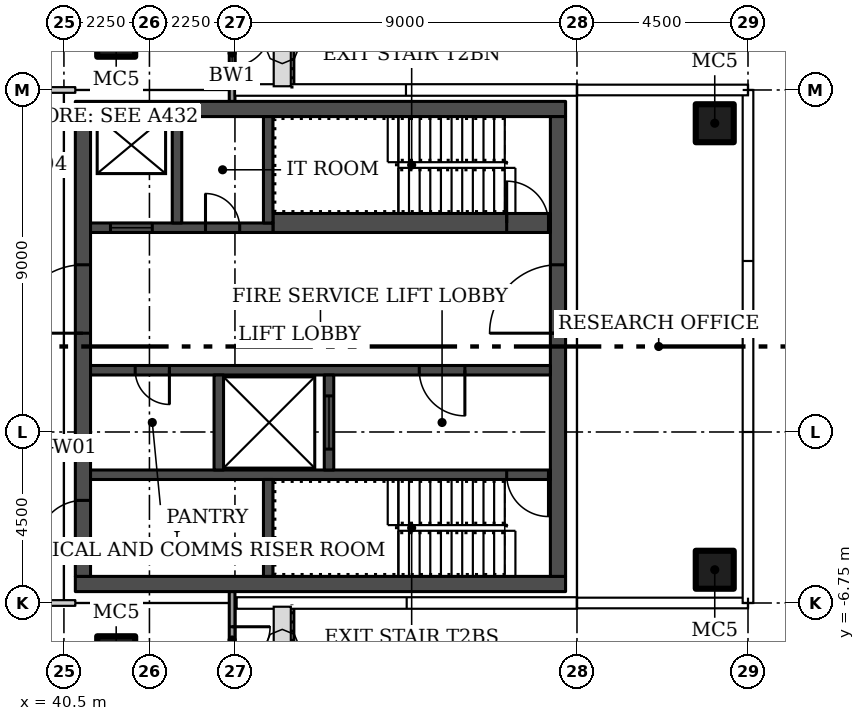
"""IFC4 building model, lengths in metres.
Left out: names, types, materials, properties, quantities, classifications, styles, units other than length and angle.
Written with IfcOpenShell. Run it as: python <this file> out.ifc"""

import sys

from ifc_helpers import new_model, si_unit, direction, frame, frame_2d, origin, origin_2d, place, context, subcontext, project, spatial, rectangle, hollow_rectangle, extrude, element, fill, save


model = new_model("IFC4")
c1 = context("Model", 3, precision=1e-05, world=origin(), true_north=direction((0.0, 1.0)))
c2 = subcontext(c1, "Body", "Model", "MODEL_VIEW")
j1 = project(units=[si_unit("LENGTHUNIT", "METRE"), si_unit("PLANEANGLEUNIT", "RADIAN")], contexts=[c1])
p1 = place(None, origin())
s1 = spatial("IfcSite", under=j1, at=p1, CompositionType="ELEMENT")
p2 = place(p1, origin())
s2 = spatial("IfcBuilding", under=s1, at=p2, CompositionType="ELEMENT")
p3 = place(p2, frame((0.0, 0.0, 182.7)))
s3 = spatial("IfcBuildingStorey", under=s2, at=p3, CompositionType="ELEMENT", Elevation=182.7)
for number, where in (
    (1, (41.875, 8.125, 0.0)),
    (2, (41.875, -8.125, 0.0)),
    (3, (57.625, -5.875, 0.0)),
    (4, (57.625, 5.875, 0.0)),
):
    element("IfcColumn", number, at=place(p3, frame(where)), inside=s3, PredefinedType="COLUMN", context=c2, shape_type="SweptSolid", body=[
        extrude(hollow_rectangle(XDim=1.0, YDim=1.0, WallThickness=0.04, at=origin_2d()), origin(), (0.0, 0.0, 1.0), 3.55),
    ])
p4 = place(p3, frame((26.7, 6.75, 0.0)))
e5 = element("IfcWall", 5, at=p4, inside=s3, PredefinedType="PARTITIONING", context=c2, shape_type="SweptSolid", body=[
    extrude(rectangle(XDim=14.1, YDim=0.15, at=frame_2d((7.05, 0.0))), origin(), (0.0, 0.0, 1.0), 3.55),
])
p5 = place(p4, frame((10.8, 0.0, 0.0)))
e6 = element("IfcOpeningElement", 6, at=p5, cuts=e5, PredefinedType="OPENING", context=c2, shape_type="SweptSolid", body=[
    extrude(rectangle(XDim=1.5, YDim=2.1, at=frame_2d((0.75, 1.05))), frame((0.0, 0.085, 0.0), z_axis=(0.0, -1.0, 0.0), x_axis=(1.0, 0.0, 0.0)), (0.0, 0.0, 1.0), 0.17),
])
p6 = place(p4, frame((6.6, 0.0, 0.0)))
e7 = element("IfcOpeningElement", 7, at=p6, cuts=e5, PredefinedType="OPENING", context=c2, shape_type="SweptSolid", body=[
    extrude(rectangle(XDim=0.9, YDim=2.1, at=frame_2d((0.45, 1.05))), frame((0.0, 0.085, 0.0), z_axis=(0.0, -1.0, 0.0), x_axis=(1.0, 0.0, 0.0)), (0.0, 0.0, 1.0), 0.17),
])
p7 = place(p4, frame((1.8, 0.0, 0.0)))
e8 = element("IfcOpeningElement", 8, at=p7, cuts=e5, PredefinedType="OPENING", context=c2, shape_type="SweptSolid", body=[
    extrude(rectangle(XDim=1.5, YDim=2.1, at=frame_2d((0.75, 1.05))), frame((0.0, 0.085, 0.0), z_axis=(0.0, -1.0, 0.0), x_axis=(1.0, 0.0, 0.0)), (0.0, 0.0, 1.0), 0.17),
])
p8 = place(p3, frame((40.8, -6.75, 0.0), z_axis=(0.0, 0.0, 1.0), x_axis=(-1.0, 0.0, 0.0)))
e9 = element("IfcWall", 9, at=p8, inside=s3, PredefinedType="PARTITIONING", context=c2, shape_type="SweptSolid", body=[
    extrude(rectangle(XDim=14.1, YDim=0.15, at=frame_2d((7.05, 0.0))), origin(), (0.0, 0.0, 1.0), 3.55),
])
p9 = place(p8, frame((6.3, 0.0, 0.0)))
e10 = element("IfcOpeningElement", 10, at=p9, cuts=e9, PredefinedType="OPENING", context=c2, shape_type="SweptSolid", body=[
    extrude(rectangle(XDim=1.5, YDim=2.1, at=frame_2d((0.75, 1.05))), frame((0.0, 0.085, 0.0), z_axis=(0.0, -1.0, 0.0), x_axis=(1.0, 0.0, 0.0)), (0.0, 0.0, 1.0), 0.17),
])
p10 = place(p3, frame((44.925, 9.0, 0.0), z_axis=(0.0, 0.0, 1.0), x_axis=(0.0, -1.0, 0.0)))
e11 = element("IfcWall", 11, at=p10, inside=s3, PredefinedType="SOLIDWALL", context=c2, shape_type="SweptSolid", body=[
    extrude(rectangle(XDim=2.557, YDim=0.15, at=frame_2d((1.278, 0.0))), origin(), (0.0, 0.0, 1.0), 3.45),
])
p11 = place(p10, frame((0.625, 0.0, 0.0)))
e12 = element("IfcOpeningElement", 12, at=p11, cuts=e11, PredefinedType="OPENING", context=c2, shape_type="SweptSolid", body=[
    extrude(rectangle(XDim=1.0, YDim=2.4, at=frame_2d((0.5, 1.2))), frame((0.0, 0.085, 0.0), z_axis=(0.0, -1.0, 0.0), x_axis=(1.0, 0.0, 0.0)), (0.0, 0.0, 1.0), 0.17),
])
p12 = place(p3, frame((44.925, -6.448, 0.0), z_axis=(0.0, 0.0, 1.0), x_axis=(0.0, -1.0, 0.0)))
e13 = element("IfcWall", 13, at=p12, inside=s3, PredefinedType="SOLIDWALL", context=c2, shape_type="SweptSolid", body=[
    extrude(rectangle(XDim=2.552, YDim=0.15, at=frame_2d((1.276, 0.0))), origin(), (0.0, 0.0, 1.0), 3.45),
])
p13 = place(p12, frame((0.927, 0.0, 0.0)))
e14 = element("IfcOpeningElement", 14, at=p13, cuts=e13, PredefinedType="OPENING", context=c2, shape_type="SweptSolid", body=[
    extrude(rectangle(XDim=1.0, YDim=2.4, at=frame_2d((0.5, 1.2))), frame((0.0, 0.085, 0.0), z_axis=(0.0, -1.0, 0.0), x_axis=(1.0, 0.0, 0.0)), (0.0, 0.0, 1.0), 0.17),
])
for number, where, z_axis, x_axis in (
    (15, (53.7, -6.25, 0.0), (0.0, 0.0, 1.0), (-1.0, 0.0, 0.0)),
    (16, (53.7, 6.25, 0.0), (0.0, 0.0, 1.0), (-1.0, 0.0, 0.0)),
):
    element("IfcWall", number, at=place(p3, frame(where, z_axis=z_axis, x_axis=x_axis)), inside=s3, PredefinedType="SHEAR", context=c2, shape_type="SweptSolid", body=[
        extrude(rectangle(XDim=12.9, YDim=0.4, at=frame_2d((6.45, 0.0))), origin(), (0.0, 0.0, 1.0), 3.55),
    ])
p14 = place(p3, frame((53.5, -6.05, 0.0), z_axis=(0.0, 0.0, 1.0), x_axis=(0.0, 1.0, 0.0)))
e17 = element("IfcWall", 17, at=p14, inside=s3, PredefinedType="SHEAR", context=c2, shape_type="SweptSolid", body=[
    extrude(rectangle(XDim=12.1, YDim=0.4, at=frame_2d((6.05, 0.0))), origin(), (0.0, 0.0, 1.0), 3.55),
])
p15 = place(p14, frame((6.4, 0.0, 0.0)))
e18 = element("IfcOpeningElement", 18, at=p15, cuts=e17, PredefinedType="OPENING", context=c2, shape_type="SweptSolid", body=[
    extrude(rectangle(XDim=1.8, YDim=2.4, at=frame_2d((0.9, 1.2))), frame((0.0, 0.21, 0.0), z_axis=(0.0, -1.0, 0.0), x_axis=(1.0, 0.0, 0.0)), (0.0, 0.0, 1.0), 0.42),
])
p16 = place(p3, frame((41.0, -6.05, 0.0), z_axis=(0.0, 0.0, 1.0), x_axis=(0.0, 1.0, 0.0)))
e19 = element("IfcWall", 19, at=p16, inside=s3, PredefinedType="SHEAR", context=c2, shape_type="SweptSolid", body=[
    extrude(rectangle(XDim=12.1, YDim=0.4, at=frame_2d((6.05, 0.0))), origin(), (0.0, 0.0, 1.0), 3.55),
])
p17 = place(p16, frame((0.8, 0.0, 0.0)))
e20 = element("IfcOpeningElement", 20, at=p17, cuts=e19, PredefinedType="OPENING", context=c2, shape_type="SweptSolid", body=[
    extrude(rectangle(XDim=1.2, YDim=2.1, at=frame_2d((0.6, 1.05))), frame((0.0, 0.21, 0.0), z_axis=(0.0, -1.0, 0.0), x_axis=(1.0, 0.0, 0.0)), (0.0, 0.0, 1.0), 0.42),
])
p18 = place(p16, frame((6.4, 0.0, 0.0)))
e21 = element("IfcOpeningElement", 21, at=p18, cuts=e19, PredefinedType="OPENING", context=c2, shape_type="SweptSolid", body=[
    extrude(rectangle(XDim=1.8, YDim=2.4, at=frame_2d((0.9, 1.2))), frame((0.0, 0.21, 0.0), z_axis=(0.0, -1.0, 0.0), x_axis=(1.0, 0.0, 0.0)), (0.0, 0.0, 1.0), 0.42),
])
p19 = place(p3, frame((53.3, -3.375, 0.0), z_axis=(0.0, 0.0, 1.0), x_axis=(-1.0, 0.0, 0.0)))
e22 = element("IfcWall", 22, at=p19, inside=s3, PredefinedType="SHEAR", context=c2, shape_type="SweptSolid", body=[
    extrude(rectangle(XDim=12.1, YDim=0.25, at=frame_2d((6.05, 0.0))), origin(), (0.0, 0.0, 1.0), 3.55),
])
p20 = place(p19, frame((0.05, 0.0, 0.0)))
e23 = element("IfcOpeningElement", 23, at=p20, cuts=e22, PredefinedType="OPENING", context=c2, shape_type="SweptSolid", body=[
    extrude(rectangle(XDim=1.1, YDim=2.1, at=frame_2d((0.55, 1.05))), frame((0.0, 0.135, 0.0), z_axis=(0.0, -1.0, 0.0), x_axis=(1.0, 0.0, 0.0)), (0.0, 0.0, 1.0), 0.27),
])
p21 = place(p3, frame((45.875, -6.05, 0.0), z_axis=(0.0, 0.0, 1.0), x_axis=(0.0, 1.0, 0.0)))
e24 = element("IfcWall", 24, at=p21, inside=s3, PredefinedType="SHEAR", context=c2, shape_type="SweptSolid", body=[
    extrude(rectangle(XDim=2.55, YDim=0.25, at=frame_2d((1.275, 0.0))), origin(), (0.0, 0.0, 1.0), 3.55),
])
p22 = place(p3, frame((53.3, -0.625, 0.0), z_axis=(0.0, 0.0, 1.0), x_axis=(-1.0, 0.0, 0.0)))
e25 = element("IfcWall", 25, at=p22, inside=s3, PredefinedType="SHEAR", context=c2, shape_type="SweptSolid", body=[
    extrude(rectangle(XDim=12.1, YDim=0.25, at=frame_2d((6.05, 0.0))), origin(), (0.0, 0.0, 1.0), 3.55),
])
p23 = place(p22, frame((2.25, 0.0, 0.0)))
e26 = element("IfcOpeningElement", 26, at=p23, cuts=e25, PredefinedType="OPENING", context=c2, shape_type="SweptSolid", body=[
    extrude(rectangle(XDim=1.2, YDim=2.1, at=frame_2d((0.6, 1.05))), frame((0.0, 0.135, 0.0), z_axis=(0.0, -1.0, 0.0), x_axis=(1.0, 0.0, 0.0)), (0.0, 0.0, 1.0), 0.27),
])
p24 = place(p22, frame((10.025, 0.0, 0.0)))
e27 = element("IfcOpeningElement", 27, at=p24, cuts=e25, PredefinedType="OPENING", context=c2, shape_type="SweptSolid", body=[
    extrude(rectangle(XDim=0.9, YDim=2.1, at=frame_2d((0.45, 1.05))), frame((0.0, 0.135, 0.0), z_axis=(0.0, -1.0, 0.0), x_axis=(1.0, 0.0, 0.0)), (0.0, 0.0, 1.0), 0.27),
])
p25 = place(p3, frame((47.475, -3.25, 0.0), z_axis=(0.0, 0.0, 1.0), x_axis=(0.0, 1.0, 0.0)))
e28 = element("IfcWall", 28, at=p25, inside=s3, PredefinedType="SHEAR", context=c2, shape_type="SweptSolid", body=[
    extrude(rectangle(XDim=2.5, YDim=0.25, at=frame_2d((1.25, 0.0))), origin(), (0.0, 0.0, 1.0), 3.55),
])
p26 = place(p25, frame((0.55, 0.0, 0.0)))
e29 = element("IfcOpeningElement", 29, at=p26, cuts=e28, PredefinedType="OPENING", context=c2, shape_type="SweptSolid", body=[
    extrude(rectangle(XDim=1.4, YDim=2.4, at=frame_2d((0.7, 1.2))), frame((0.0, 0.135, 0.0), z_axis=(0.0, -1.0, 0.0), x_axis=(1.0, 0.0, 0.0)), (0.0, 0.0, 1.0), 0.27),
])
p27 = place(p3, frame((44.575, -3.25, 0.0), z_axis=(0.0, 0.0, 1.0), x_axis=(0.0, 1.0, 0.0)))
e30 = element("IfcWall", 30, at=p27, inside=s3, PredefinedType="SHEAR", context=c2, shape_type="SweptSolid", body=[
    extrude(rectangle(XDim=2.5, YDim=0.25, at=frame_2d((1.25, 0.0))), origin(), (0.0, 0.0, 1.0), 3.55),
])
p28 = place(p3, frame((46.0, 3.25, 0.0)))
e31 = element("IfcWall", 31, at=p28, inside=s3, PredefinedType="SHEAR", context=c2, shape_type="SweptSolid", body=[
    extrude(rectangle(XDim=7.3, YDim=0.5, at=frame_2d((3.65, 0.0))), origin(), (0.0, 0.0, 1.0), 3.55),
])
p29 = place(p28, frame((6.15, 0.0, 0.0)))
e32 = element("IfcOpeningElement", 32, at=p29, cuts=e31, PredefinedType="OPENING", context=c2, shape_type="SweptSolid", body=[
    extrude(rectangle(XDim=1.1, YDim=2.1, at=frame_2d((0.55, 1.05))), frame((0.0, 0.26, 0.0), z_axis=(0.0, -1.0, 0.0), x_axis=(1.0, 0.0, 0.0)), (0.0, 0.0, 1.0), 0.52),
])
p30 = place(p3, frame((41.2, 3.125, 0.0)))
e33 = element("IfcWall", 33, at=p30, inside=s3, PredefinedType="SHEAR", context=c2, shape_type="SweptSolid", body=[
    extrude(rectangle(XDim=4.8, YDim=0.25, at=frame_2d((2.4, 0.0))), origin(), (0.0, 0.0, 1.0), 3.55),
])
p31 = place(p30, frame((0.525, 0.0, 0.0)))
e34 = element("IfcOpeningElement", 34, at=p31, cuts=e33, PredefinedType="OPENING", context=c2, shape_type="SweptSolid", body=[
    extrude(rectangle(XDim=1.1, YDim=2.1, at=frame_2d((0.55, 1.05))), frame((0.0, 0.135, 0.0), z_axis=(0.0, -1.0, 0.0), x_axis=(1.0, 0.0, 0.0)), (0.0, 0.0, 1.0), 0.27),
])
p32 = place(p30, frame((3.025, 0.0, 0.0)))
e35 = element("IfcOpeningElement", 35, at=p32, cuts=e33, PredefinedType="OPENING", context=c2, shape_type="SweptSolid", body=[
    extrude(rectangle(XDim=0.9, YDim=2.1, at=frame_2d((0.45, 1.05))), frame((0.0, 0.135, 0.0), z_axis=(0.0, -1.0, 0.0), x_axis=(1.0, 0.0, 0.0)), (0.0, 0.0, 1.0), 0.27),
])
for number, where, z_axis, x_axis in (
    (36, (45.875, 3.25, 0.0), (0.0, 0.0, 1.0), (0.0, 1.0, 0.0)),
    (37, (43.475, 3.25, 0.0), (0.0, 0.0, 1.0), (0.0, 1.0, 0.0)),
):
    element("IfcWall", number, at=place(p3, frame(where, z_axis=z_axis, x_axis=x_axis)), inside=s3, PredefinedType="SHEAR", context=c2, shape_type="SweptSolid", body=[
        extrude(rectangle(XDim=2.8, YDim=0.25, at=frame_2d((1.4, 0.0))), origin(), (0.0, 0.0, 1.0), 3.55),
    ])
p33 = place(p11, origin())
e38 = element("IfcDoor", 38, at=p33, inside=s3, OperationType="SINGLE_SWING_LEFT", PredefinedType="DOOR", context=c2, shape_type="SweptSolid", body=[
    extrude(rectangle(XDim=1.0, YDim=2.4, at=frame_2d((0.5, 1.2))), frame((0.0, 0.025, 0.0), z_axis=(0.0, -1.0, 0.0), x_axis=(1.0, 0.0, 0.0)), (0.0, 0.0, 1.0), 0.05),
])
fill(e12, e38)
p34 = place(p13, origin())
e39 = element("IfcDoor", 39, at=p34, inside=s3, OperationType="SINGLE_SWING_RIGHT", PredefinedType="DOOR", context=c2, shape_type="SweptSolid", body=[
    extrude(rectangle(XDim=1.0, YDim=2.4, at=frame_2d((0.5, 1.2))), frame((0.0, 0.025, 0.0), z_axis=(0.0, -1.0, 0.0), x_axis=(1.0, 0.0, 0.0)), (0.0, 0.0, 1.0), 0.05),
])
fill(e14, e39)
p35 = place(p15, origin())
e40 = element("IfcDoor", 40, at=p35, inside=s3, OperationType="DOUBLE_DOOR_SINGLE_SWING", PredefinedType="DOOR", context=c2, shape_type="SweptSolid", body=[
    extrude(rectangle(XDim=1.8, YDim=2.4, at=frame_2d((0.9, 1.2))), frame((0.0, 0.025, 0.0), z_axis=(0.0, -1.0, 0.0), x_axis=(1.0, 0.0, 0.0)), (0.0, 0.0, 1.0), 0.05),
])
fill(e18, e40)
p36 = place(p17, origin())
e41 = element("IfcDoor", 41, at=p36, inside=s3, OperationType="SINGLE_SWING_LEFT", PredefinedType="DOOR", context=c2, shape_type="SweptSolid", body=[
    extrude(rectangle(XDim=1.2, YDim=2.1, at=frame_2d((0.6, 1.05))), frame((0.0, 0.025, 0.0), z_axis=(0.0, -1.0, 0.0), x_axis=(1.0, 0.0, 0.0)), (0.0, 0.0, 1.0), 0.05),
])
fill(e20, e41)
p37 = place(p18, origin())
e42 = element("IfcDoor", 42, at=p37, inside=s3, OperationType="DOUBLE_DOOR_SINGLE_SWING", PredefinedType="DOOR", context=c2, shape_type="SweptSolid", body=[
    extrude(rectangle(XDim=1.8, YDim=2.4, at=frame_2d((0.9, 1.2))), frame((0.0, 0.025, 0.0), z_axis=(0.0, -1.0, 0.0), x_axis=(1.0, 0.0, 0.0)), (0.0, 0.0, 1.0), 0.05),
])
fill(e21, e42)
p38 = place(p20, origin())
e43 = element("IfcDoor", 43, at=p38, inside=s3, OperationType="SINGLE_SWING_LEFT", PredefinedType="DOOR", context=c2, shape_type="SweptSolid", body=[
    extrude(rectangle(XDim=1.1, YDim=2.1, at=frame_2d((0.55, 1.05))), frame((0.0, 0.025, 0.0), z_axis=(0.0, -1.0, 0.0), x_axis=(1.0, 0.0, 0.0)), (0.0, 0.0, 1.0), 0.05),
])
fill(e23, e43)
p39 = place(p23, origin())
e44 = element("IfcDoor", 44, at=p39, inside=s3, OperationType="SINGLE_SWING_LEFT", PredefinedType="DOOR", context=c2, shape_type="SweptSolid", body=[
    extrude(rectangle(XDim=1.2, YDim=2.1, at=frame_2d((0.6, 1.05))), frame((0.0, 0.025, 0.0), z_axis=(0.0, -1.0, 0.0), x_axis=(1.0, 0.0, 0.0)), (0.0, 0.0, 1.0), 0.05),
])
fill(e26, e44)
p40 = place(p24, origin())
e45 = element("IfcDoor", 45, at=p40, inside=s3, OperationType="SINGLE_SWING_RIGHT", PredefinedType="DOOR", context=c2, shape_type="SweptSolid", body=[
    extrude(rectangle(XDim=0.9, YDim=2.1, at=frame_2d((0.45, 1.05))), frame((0.0, 0.025, 0.0), z_axis=(0.0, -1.0, 0.0), x_axis=(1.0, 0.0, 0.0)), (0.0, 0.0, 1.0), 0.05),
])
fill(e27, e45)
p41 = place(p26, origin())
e46 = element("IfcDoor", 46, at=p41, inside=s3, OperationType="SLIDING_TO_LEFT", PredefinedType="DOOR", context=c2, shape_type="SweptSolid", body=[
    extrude(rectangle(XDim=1.4, YDim=2.4, at=frame_2d((0.7, 1.2))), frame((0.0, 0.025, 0.0), z_axis=(0.0, -1.0, 0.0), x_axis=(1.0, 0.0, 0.0)), (0.0, 0.0, 1.0), 0.05),
])
fill(e29, e46)
p42 = place(p29, origin())
e47 = element("IfcDoor", 47, at=p42, inside=s3, OperationType="SINGLE_SWING_RIGHT", PredefinedType="DOOR", context=c2, shape_type="SweptSolid", body=[
    extrude(rectangle(XDim=1.1, YDim=2.1, at=frame_2d((0.55, 1.05))), frame((0.0, 0.025, 0.0), z_axis=(0.0, -1.0, 0.0), x_axis=(1.0, 0.0, 0.0)), (0.0, 0.0, 1.0), 0.05),
])
fill(e32, e47)
p43 = place(p31, origin())
e48 = element("IfcDoor", 48, at=p43, inside=s3, OperationType="SLIDING_TO_LEFT", PredefinedType="DOOR", context=c2, shape_type="SweptSolid", body=[
    extrude(rectangle(XDim=1.1, YDim=2.1, at=frame_2d((0.55, 1.05))), frame((0.0, 0.025, 0.0), z_axis=(0.0, -1.0, 0.0), x_axis=(1.0, 0.0, 0.0)), (0.0, 0.0, 1.0), 0.05),
])
fill(e34, e48)
p44 = place(p32, origin())
e49 = element("IfcDoor", 49, at=p44, inside=s3, OperationType="SINGLE_SWING_RIGHT", PredefinedType="DOOR", context=c2, shape_type="SweptSolid", body=[
    extrude(rectangle(XDim=0.9, YDim=2.1, at=frame_2d((0.45, 1.05))), frame((0.0, 0.025, 0.0), z_axis=(0.0, -1.0, 0.0), x_axis=(1.0, 0.0, 0.0)), (0.0, 0.0, 1.0), 0.05),
])
fill(e35, e49)
save(model, sys.argv[1])
